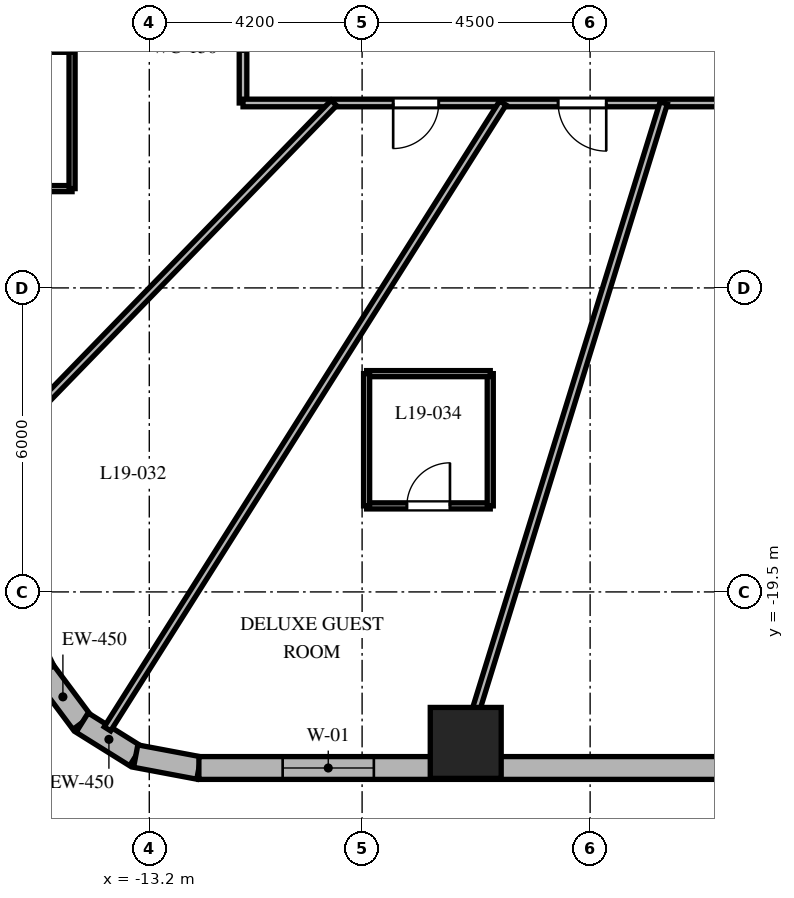
"""IFC4 building model, lengths in metres.
Left out: names, types, materials, properties, quantities, classifications, styles, units other than length and angle.
Written with IfcOpenShell. Run it as: python <this file> out.ifc"""

import sys

from ifc_helpers import new_model, si_unit, direction, frame, frame_2d, origin, origin_2d, place, context, subcontext, project, spatial, rectangle, extrude, element, fill, save


model = new_model("IFC4")
c1 = context("Model", 3, precision=1e-05, world=origin(), true_north=direction((0.0, 1.0)))
c2 = subcontext(c1, "Body", "Model", "MODEL_VIEW")
j1 = project(units=[si_unit("LENGTHUNIT", "METRE"), si_unit("PLANEANGLEUNIT", "RADIAN")], contexts=[c1])
p1 = place(None, origin())
s1 = spatial("IfcSite", under=j1, at=p1, CompositionType="ELEMENT")
p2 = place(p1, origin())
s2 = spatial("IfcBuilding", under=s1, at=p2, CompositionType="ELEMENT")
p3 = place(p2, frame((0.0, 0.0, 82.3)))
s3 = spatial("IfcBuildingStorey", under=s2, at=p3, CompositionType="ELEMENT", Elevation=82.3)
p4 = place(p3, frame((-6.955, -22.48, 0.0), z_axis=(0.0, 0.0, 1.0), x_axis=(1.0, 0.0, 0.0)))
e1 = element("IfcColumn", 1, at=p4, inside=s3, PredefinedType="COLUMN", context=c2, shape_type="SweptSolid", body=[
    extrude(rectangle(XDim=1.4, YDim=1.4, at=origin_2d()), origin(), (0.0, 0.0, 1.0), 3.7),
])
p5 = place(p3, frame((-15.284, -21.062, 0.0), z_axis=(0.0, 0.0, 1.0), x_axis=(0.597595366449, -0.801797841104, 0.0)))
e2 = element("IfcWall", 2, at=p5, inside=s3, PredefinedType="SOLIDWALL", context=c2, shape_type="SweptSolid", body=[
    extrude(rectangle(XDim=1.269, YDim=0.45, at=frame_2d((0.634, 0.0))), origin(), (0.0, 0.0, 1.0), 3.38),
])
p6 = place(p3, frame((-14.526, -22.08, 0.0), z_axis=(0.0, 0.0, 1.0), x_axis=(0.848185203596, -0.529699783275, 0.0)))
e3 = element("IfcWall", 3, at=p6, inside=s3, PredefinedType="SOLIDWALL", context=c2, shape_type="SweptSolid", body=[
    extrude(rectangle(XDim=1.247, YDim=0.45, at=frame_2d((0.624, 0.0))), origin(), (0.0, 0.0, 1.0), 3.38),
])
p7 = place(p3, frame((-13.468, -22.74, 0.0), z_axis=(0.0, 0.0, 1.0), x_axis=(0.982717174228, -0.185113358451, 0.0)))
e4 = element("IfcWall", 4, at=p7, inside=s3, PredefinedType="SOLIDWALL", context=c2, shape_type="SweptSolid", body=[
    extrude(rectangle(XDim=1.269, YDim=0.45, at=frame_2d((0.634, 0.0))), origin(), (0.0, 0.0, 1.0), 3.38),
])
p8 = place(p3, frame((-12.221, -22.975, 0.0), z_axis=(0.0, 0.0, 1.0), x_axis=(1.0, 0.0, 0.0)))
e5 = element("IfcWall", 5, at=p8, inside=s3, PredefinedType="SOLIDWALL", context=c2, shape_type="SweptSolid", body=[
    extrude(rectangle(XDim=26.389, YDim=0.45, at=frame_2d((13.195, 0.0))), origin(), (0.0, 0.0, 1.0), 3.38),
])
p9 = place(p8, frame((1.653, 0.0, 0.8)))
e6 = element("IfcOpeningElement", 6, at=p9, cuts=e5, PredefinedType="OPENING", context=c2, shape_type="SweptSolid", body=[
    extrude(rectangle(XDim=1.8, YDim=1.8, at=frame_2d((0.9, 0.9))), frame((0.0, 0.235, 0.0), z_axis=(0.0, -1.0, 0.0), x_axis=(1.0, 0.0, 0.0)), (0.0, 0.0, 1.0), 0.47),
])
p10 = place(p8, frame((12.296, 0.0, 0.8)))
e7 = element("IfcOpeningElement", 7, at=p10, cuts=e5, PredefinedType="OPENING", context=c2, shape_type="SweptSolid", body=[
    extrude(rectangle(XDim=1.8, YDim=1.8, at=frame_2d((0.9, 0.9))), frame((0.0, 0.235, 0.0), z_axis=(0.0, -1.0, 0.0), x_axis=(1.0, 0.0, 0.0)), (0.0, 0.0, 1.0), 0.47),
])
p11 = place(p8, frame((22.938, 0.0, 0.8)))
e8 = element("IfcOpeningElement", 8, at=p11, cuts=e5, PredefinedType="OPENING", context=c2, shape_type="SweptSolid", body=[
    extrude(rectangle(XDim=1.8, YDim=1.8, at=frame_2d((0.9, 0.9))), frame((0.0, 0.235, 0.0), z_axis=(0.0, -1.0, 0.0), x_axis=(1.0, 0.0, 0.0)), (0.0, 0.0, 1.0), 0.47),
])
p12 = place(p3, frame((-24.336, -2.532, 0.0), z_axis=(0.0, 0.0, 1.0), x_axis=(0.438931326393, -0.898520612291, 0.0)))
e9 = element("IfcWall", 9, at=p12, inside=s3, PredefinedType="SOLIDWALL", context=c2, shape_type="SweptSolid", body=[
    extrude(rectangle(XDim=20.623, YDim=0.45, at=frame_2d((10.312, 0.0))), origin(), (0.0, 0.0, 1.0), 3.38),
])
p13 = place(p12, frame((5.171, 0.0, 0.0)))
e10 = element("IfcOpeningElement", 10, at=p13, cuts=e9, PredefinedType="OPENING", context=c2, shape_type="SweptSolid", body=[
    extrude(rectangle(XDim=0.95, YDim=2.15, at=frame_2d((0.475, 1.075))), frame((0.0, 0.235, 0.0), z_axis=(0.0, -1.0, 0.0), x_axis=(1.0, 0.0, 0.0)), (0.0, 0.0, 1.0), 0.47),
])
p14 = place(p12, frame((1.214, 0.0, 0.8)))
e11 = element("IfcOpeningElement", 11, at=p14, cuts=e9, PredefinedType="OPENING", context=c2, shape_type="SweptSolid", body=[
    extrude(rectangle(XDim=1.8, YDim=1.8, at=frame_2d((0.9, 0.9))), frame((0.0, 0.235, 0.0), z_axis=(0.0, -1.0, 0.0), x_axis=(1.0, 0.0, 0.0)), (0.0, 0.0, 1.0), 0.47),
])
p15 = place(p12, frame((9.462, 0.0, 0.8)))
e12 = element("IfcOpeningElement", 12, at=p15, cuts=e9, PredefinedType="OPENING", context=c2, shape_type="SweptSolid", body=[
    extrude(rectangle(XDim=1.8, YDim=1.8, at=frame_2d((0.9, 0.9))), frame((0.0, 0.235, 0.0), z_axis=(0.0, -1.0, 0.0), x_axis=(1.0, 0.0, 0.0)), (0.0, 0.0, 1.0), 0.47),
])
p16 = place(p12, frame((17.66, 0.0, 0.8)))
e13 = element("IfcOpeningElement", 13, at=p16, cuts=e9, PredefinedType="OPENING", context=c2, shape_type="SweptSolid", body=[
    extrude(rectangle(XDim=1.8, YDim=1.8, at=frame_2d((0.9, 0.9))), frame((0.0, 0.235, 0.0), z_axis=(0.0, -1.0, 0.0), x_axis=(1.0, 0.0, 0.0)), (0.0, 0.0, 1.0), 0.47),
])
p17 = place(p3, frame((-11.35, -9.85, 0.0), z_axis=(0.0, 0.0, 1.0), x_axis=(0.0, 1.0, 0.0)))
e14 = element("IfcWall", 14, at=p17, inside=s3, PredefinedType="PARTITIONING", context=c2, shape_type="SweptSolid", body=[
    extrude(rectangle(XDim=19.7, YDim=0.15, at=frame_2d((9.85, 0.0))), origin(), (0.0, 0.0, 1.0), 2.82),
])
p18 = place(p17, frame((17.206, 0.0, 0.0)))
e15 = element("IfcOpeningElement", 15, at=p18, cuts=e14, PredefinedType="OPENING", context=c2, shape_type="SweptSolid", body=[
    extrude(rectangle(XDim=0.9, YDim=2.03, at=frame_2d((0.45, 1.015))), frame((0.0, 0.085, 0.0), z_axis=(0.0, -1.0, 0.0), x_axis=(1.0, 0.0, 0.0)), (0.0, 0.0, 1.0), 0.17),
])
p19 = place(p17, frame((13.403, 0.0, 0.0)))
e16 = element("IfcOpeningElement", 16, at=p19, cuts=e14, PredefinedType="OPENING", context=c2, shape_type="SweptSolid", body=[
    extrude(rectangle(XDim=0.95, YDim=2.03, at=frame_2d((0.475, 1.015))), frame((0.0, 0.085, 0.0), z_axis=(0.0, -1.0, 0.0), x_axis=(1.0, 0.0, 0.0)), (0.0, 0.0, 1.0), 0.17),
])
p20 = place(p17, frame((10.134, 0.0, 0.0)))
e17 = element("IfcOpeningElement", 17, at=p20, cuts=e14, PredefinedType="OPENING", context=c2, shape_type="SweptSolid", body=[
    extrude(rectangle(XDim=0.95, YDim=2.03, at=frame_2d((0.475, 1.015))), frame((0.0, 0.085, 0.0), z_axis=(0.0, -1.0, 0.0), x_axis=(1.0, 0.0, 0.0)), (0.0, 0.0, 1.0), 0.17),
])
p21 = place(p17, frame((7.571, 0.0, 0.0)))
e18 = element("IfcOpeningElement", 18, at=p21, cuts=e14, PredefinedType="OPENING", context=c2, shape_type="SweptSolid", body=[
    extrude(rectangle(XDim=0.95, YDim=2.03, at=frame_2d((0.475, 1.015))), frame((0.0, 0.085, 0.0), z_axis=(0.0, -1.0, 0.0), x_axis=(1.0, 0.0, 0.0)), (0.0, 0.0, 1.0), 0.17),
])
p22 = place(p17, frame((3.024, 0.0, 0.0)))
e19 = element("IfcOpeningElement", 19, at=p22, cuts=e14, PredefinedType="OPENING", context=c2, shape_type="SweptSolid", body=[
    extrude(rectangle(XDim=0.95, YDim=2.03, at=frame_2d((0.475, 1.015))), frame((0.0, 0.085, 0.0), z_axis=(0.0, -1.0, 0.0), x_axis=(1.0, 0.0, 0.0)), (0.0, 0.0, 1.0), 0.17),
])
p23 = place(p3, frame((11.35, -9.85, 0.0), z_axis=(0.0, 0.0, 1.0), x_axis=(-1.0, 0.0, 0.0)))
e20 = element("IfcWall", 20, at=p23, inside=s3, PredefinedType="PARTITIONING", context=c2, shape_type="SweptSolid", body=[
    extrude(rectangle(XDim=22.7, YDim=0.15, at=frame_2d((11.35, 0.0))), origin(), (0.0, 0.0, 1.0), 2.82),
])
p24 = place(p23, frame((18.837, 0.0, 0.0)))
e21 = element("IfcOpeningElement", 21, at=p24, cuts=e20, PredefinedType="OPENING", context=c2, shape_type="SweptSolid", body=[
    extrude(rectangle(XDim=0.9, YDim=2.03, at=frame_2d((0.45, 1.015))), frame((0.0, 0.085, 0.0), z_axis=(0.0, -1.0, 0.0), x_axis=(1.0, 0.0, 0.0)), (0.0, 0.0, 1.0), 0.17),
])
p25 = place(p23, frame((15.532, 0.0, 0.0)))
e22 = element("IfcOpeningElement", 22, at=p25, cuts=e20, PredefinedType="OPENING", context=c2, shape_type="SweptSolid", body=[
    extrude(rectangle(XDim=0.95, YDim=2.03, at=frame_2d((0.475, 1.015))), frame((0.0, 0.085, 0.0), z_axis=(0.0, -1.0, 0.0), x_axis=(1.0, 0.0, 0.0)), (0.0, 0.0, 1.0), 0.17),
])
p26 = place(p23, frame((10.444, 0.0, 0.0)))
e23 = element("IfcOpeningElement", 23, at=p26, cuts=e20, PredefinedType="OPENING", context=c2, shape_type="SweptSolid", body=[
    extrude(rectangle(XDim=0.95, YDim=2.03, at=frame_2d((0.475, 1.015))), frame((0.0, 0.085, 0.0), z_axis=(0.0, -1.0, 0.0), x_axis=(1.0, 0.0, 0.0)), (0.0, 0.0, 1.0), 0.17),
])
p27 = place(p23, frame((3.369, 0.0, 0.0)))
e24 = element("IfcOpeningElement", 24, at=p27, cuts=e20, PredefinedType="OPENING", context=c2, shape_type="SweptSolid", body=[
    extrude(rectangle(XDim=0.95, YDim=2.03, at=frame_2d((0.475, 1.015))), frame((0.0, 0.085, 0.0), z_axis=(0.0, -1.0, 0.0), x_axis=(1.0, 0.0, 0.0)), (0.0, 0.0, 1.0), 0.17),
])
p28 = place(p3, frame((-9.558, -9.85, 0.0), z_axis=(0.0, 0.0, 1.0), x_axis=(-0.69638346089, -0.717669893056, 0.0)))
e25 = element("IfcWall", 25, at=p28, inside=s3, PredefinedType="PARTITIONING", context=c2, shape_type="SweptSolid", body=[
    extrude(rectangle(XDim=10.701, YDim=0.15, at=frame_2d((5.351, 0.0))), origin(), (0.0, 0.0, 1.0), 2.52),
])
p29 = place(p3, frame((-6.222, -9.85, 0.0), z_axis=(0.0, 0.0, 1.0), x_axis=(-0.534069056435, -0.845440857162, 0.0)))
e26 = element("IfcWall", 26, at=p29, inside=s3, PredefinedType="PARTITIONING", context=c2, shape_type="SweptSolid", body=[
    extrude(rectangle(XDim=14.611, YDim=0.15, at=frame_2d((7.306, 0.0))), origin(), (0.0, 0.0, 1.0), 2.52),
])
p30 = place(p3, frame((-3.048, -9.85, 0.0), z_axis=(0.0, 0.0, 1.0), x_axis=(-0.295553992761, -0.955326037206, 0.0)))
e27 = element("IfcWall", 27, at=p30, inside=s3, PredefinedType="PARTITIONING", context=c2, shape_type="SweptSolid", body=[
    extrude(rectangle(XDim=13.739, YDim=0.15, at=frame_2d((6.869, 0.0))), origin(), (0.0, 0.0, 1.0), 2.52),
])
p31 = place(p3, frame((-17.324, -11.54, 0.0), z_axis=(0.0, 0.0, 1.0), x_axis=(1.0, 0.0, 0.0)))
e28 = element("IfcWall", 28, at=p31, inside=s3, PredefinedType="PARTITIONING", context=c2, shape_type="SweptSolid", body=[
    extrude(rectangle(XDim=2.6, YDim=0.12, at=frame_2d((1.3, 0.0))), origin(), (0.0, 0.0, 1.0), 2.906),
])
p32 = place(p31, frame((0.875, 0.0, 0.0)))
e29 = element("IfcOpeningElement", 29, at=p32, cuts=e28, PredefinedType="OPENING", context=c2, shape_type="SweptSolid", body=[
    extrude(rectangle(XDim=0.85, YDim=2.03, at=frame_2d((0.425, 1.015))), frame((0.0, 0.07, 0.0), z_axis=(0.0, -1.0, 0.0), x_axis=(1.0, 0.0, 0.0)), (0.0, 0.0, 1.0), 0.14),
])
p33 = place(p3, frame((-14.724, -11.54, 0.0), z_axis=(0.0, 0.0, 1.0), x_axis=(0.0, 1.0, 0.0)))
e30 = element("IfcWall", 30, at=p33, inside=s3, PredefinedType="PARTITIONING", context=c2, shape_type="SweptSolid", body=[
    extrude(rectangle(XDim=2.75, YDim=0.12, at=frame_2d((1.375, 0.0))), origin(), (0.0, 0.0, 1.0), 3.38),
])
p34 = place(p3, frame((-8.911, -17.802, 0.0), z_axis=(0.0, 0.0, 1.0), x_axis=(1.0, 0.0, 0.0)))
e31 = element("IfcWall", 31, at=p34, inside=s3, PredefinedType="PARTITIONING", context=c2, shape_type="SweptSolid", body=[
    extrude(rectangle(XDim=2.44, YDim=0.12, at=frame_2d((1.22, 0.0))), origin(), (0.0, 0.0, 1.0), 2.82),
])
p35 = place(p34, frame((0.795, 0.0, 0.0)))
e32 = element("IfcOpeningElement", 32, at=p35, cuts=e31, PredefinedType="OPENING", context=c2, shape_type="SweptSolid", body=[
    extrude(rectangle(XDim=0.85, YDim=2.03, at=frame_2d((0.425, 1.015))), frame((0.0, 0.07, 0.0), z_axis=(0.0, -1.0, 0.0), x_axis=(1.0, 0.0, 0.0)), (0.0, 0.0, 1.0), 0.14),
])
p36 = place(p3, frame((-6.471, -17.802, 0.0), z_axis=(0.0, 0.0, 1.0), x_axis=(0.0, 1.0, 0.0)))
e33 = element("IfcWall", 33, at=p36, inside=s3, PredefinedType="PARTITIONING", context=c2, shape_type="SweptSolid", body=[
    extrude(rectangle(XDim=2.61, YDim=0.12, at=frame_2d((1.305, 0.0))), origin(), (0.0, 0.0, 1.0), 2.82),
])
p37 = place(p3, frame((-6.471, -15.192, 0.0), z_axis=(0.0, 0.0, 1.0), x_axis=(-1.0, 0.0, 0.0)))
e34 = element("IfcWall", 34, at=p37, inside=s3, PredefinedType="PARTITIONING", context=c2, shape_type="SweptSolid", body=[
    extrude(rectangle(XDim=2.44, YDim=0.12, at=frame_2d((1.22, 0.0))), origin(), (0.0, 0.0, 1.0), 2.82),
])
p38 = place(p3, frame((-8.911, -15.192, 0.0), z_axis=(0.0, 0.0, 1.0), x_axis=(0.0, -1.0, 0.0)))
e35 = element("IfcWall", 35, at=p38, inside=s3, PredefinedType="PARTITIONING", context=c2, shape_type="SweptSolid", body=[
    extrude(rectangle(XDim=2.61, YDim=0.12, at=frame_2d((1.305, 0.0))), origin(), (0.0, 0.0, 1.0), 2.952),
])
p39 = place(p9, origin())
e36 = element("IfcWindow", 36, at=p39, inside=s3, PartitioningType="SINGLE_PANEL", PredefinedType="WINDOW", context=c2, shape_type="SweptSolid", body=[
    extrude(rectangle(XDim=1.8, YDim=1.8, at=frame_2d((0.9, 0.9))), frame((0.0, 0.03, 0.0), z_axis=(0.0, -1.0, 0.0), x_axis=(1.0, 0.0, 0.0)), (0.0, 0.0, 1.0), 0.06),
])
fill(e6, e36)
p40 = place(p24, origin())
e37 = element("IfcDoor", 37, at=p40, inside=s3, OperationType="SINGLE_SWING_RIGHT", PredefinedType="DOOR", context=c2, shape_type="SweptSolid", body=[
    extrude(rectangle(XDim=0.9, YDim=2.03, at=frame_2d((0.45, 1.015))), frame((0.0, 0.025, 0.0), z_axis=(0.0, -1.0, 0.0), x_axis=(1.0, 0.0, 0.0)), (0.0, 0.0, 1.0), 0.05),
])
fill(e21, e37)
p41 = place(p25, origin())
e38 = element("IfcDoor", 38, at=p41, inside=s3, OperationType="SINGLE_SWING_LEFT", PredefinedType="DOOR", context=c2, shape_type="SweptSolid", body=[
    extrude(rectangle(XDim=0.95, YDim=2.03, at=frame_2d((0.475, 1.015))), frame((0.0, 0.025, 0.0), z_axis=(0.0, -1.0, 0.0), x_axis=(1.0, 0.0, 0.0)), (0.0, 0.0, 1.0), 0.05),
])
fill(e22, e38)
p42 = place(p35, origin())
e39 = element("IfcDoor", 39, at=p42, inside=s3, OperationType="SINGLE_SWING_RIGHT", PredefinedType="DOOR", context=c2, shape_type="SweptSolid", body=[
    extrude(rectangle(XDim=0.85, YDim=2.03, at=frame_2d((0.425, 1.015))), frame((0.0, 0.025, 0.0), z_axis=(0.0, -1.0, 0.0), x_axis=(1.0, 0.0, 0.0)), (0.0, 0.0, 1.0), 0.05),
])
fill(e32, e39)
save(model, sys.argv[1])
